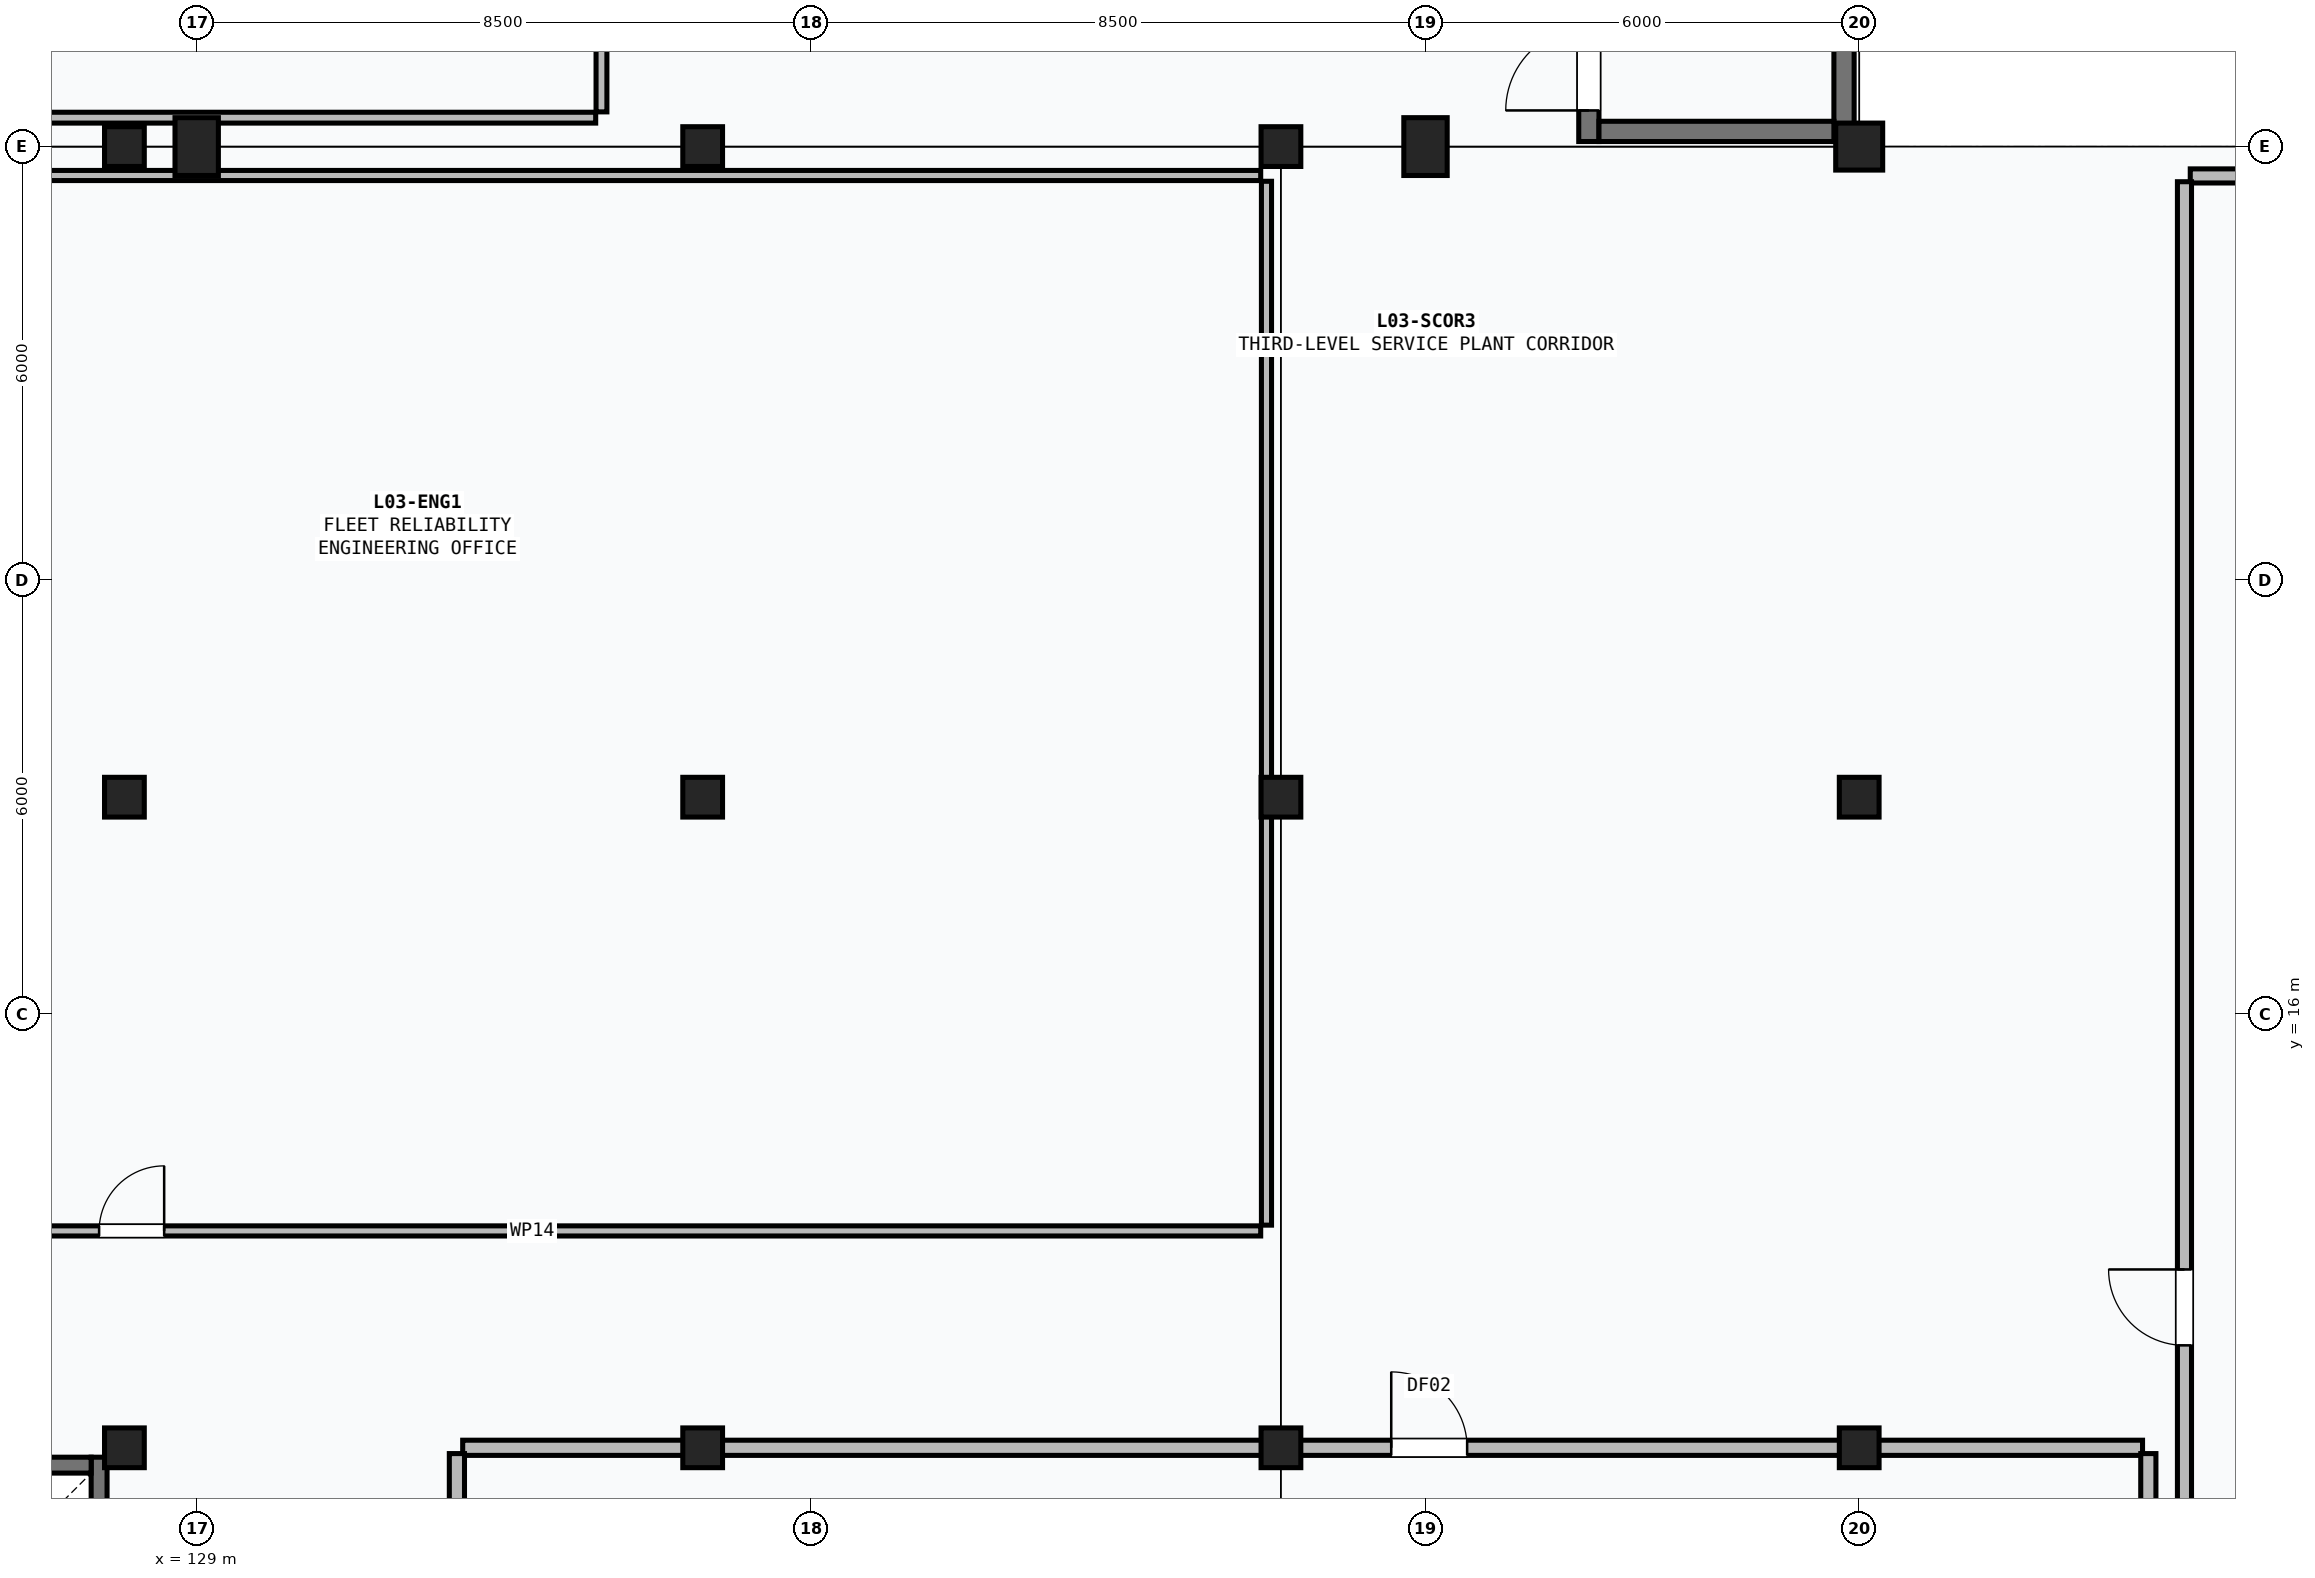
"""IFC4 building model, lengths in metres.
Left out: names, types, materials, properties, quantities, classifications, styles, units other than length and angle.
Written with IfcOpenShell. Run it as: python <this file> out.ifc"""

import sys

from ifc_helpers import new_model, si_unit, direction, frame, frame_2d, origin, origin_2d, place, context, subcontext, project, spatial, rectangle, extrude, element, fill, save


model = new_model("IFC4")
c1 = context("Model", 3, precision=1e-05, world=origin(), true_north=direction((0.0, 1.0)))
c2 = subcontext(c1, "Body", "Model", "MODEL_VIEW")
j1 = project(units=[si_unit("LENGTHUNIT", "METRE"), si_unit("PLANEANGLEUNIT", "RADIAN")], contexts=[c1])
p1 = place(None, origin())
s1 = spatial("IfcSite", under=j1, at=p1, CompositionType="ELEMENT")
p2 = place(p1, origin())
s2 = spatial("IfcBuilding", under=s1, at=p2, CompositionType="ELEMENT")
p3 = place(p2, frame((0.0, 0.0, 12.0)))
s3 = spatial("IfcBuildingStorey", under=s2, at=p3, CompositionType="ELEMENT", Elevation=12.0)
for number, where, z_axis, x_axis in (
    (1, (129.0, 28.0, 0.0), (0.0, 0.0, 1.0), (1.0, 0.0, 0.0)),
    (2, (146.0, 28.0, 0.0), (0.0, 0.0, 1.0), (1.0, 0.0, 0.0)),
):
    element("IfcColumn", number, at=place(p3, frame(where, z_axis=z_axis, x_axis=x_axis)), inside=s3, PredefinedType="COLUMN", context=c2, shape_type="SweptSolid", body=[
        extrude(rectangle(XDim=0.6, YDim=0.8, at=origin_2d()), origin(), (0.0, 0.0, 1.0), 3.6),
    ])
p4 = place(p3, frame((152.0, 28.0, 0.0), z_axis=(0.0, 0.0, 1.0), x_axis=(1.0, 0.0, 0.0)))
e3 = element("IfcColumn", 3, at=p4, inside=s3, PredefinedType="COLUMN", context=c2, shape_type="SweptSolid", body=[
    extrude(rectangle(XDim=0.65, YDim=0.65, at=origin_2d()), origin(), (0.0, 0.0, 1.0), 3.6),
])
for number, where, z_axis, x_axis in (
    (4, (128.0, 10.0, 0.0), (0.0, 0.0, 1.0), (1.0, 0.0, 0.0)),
    (5, (128.0, 19.0, 0.0), (0.0, 0.0, 1.0), (1.0, 0.0, 0.0)),
    (6, (128.0, 28.0, 0.0), (0.0, 0.0, 1.0), (1.0, 0.0, 0.0)),
    (7, (136.0, 10.0, 0.0), (0.0, 0.0, 1.0), (1.0, 0.0, 0.0)),
    (8, (136.0, 19.0, 0.0), (0.0, 0.0, 1.0), (1.0, 0.0, 0.0)),
    (9, (136.0, 28.0, 0.0), (0.0, 0.0, 1.0), (1.0, 0.0, 0.0)),
    (10, (144.0, 10.0, 0.0), (0.0, 0.0, 1.0), (1.0, 0.0, 0.0)),
    (11, (144.0, 19.0, 0.0), (0.0, 0.0, 1.0), (1.0, 0.0, 0.0)),
    (12, (144.0, 28.0, 0.0), (0.0, 0.0, 1.0), (1.0, 0.0, 0.0)),
    (13, (152.0, 10.0, 0.0), (0.0, 0.0, 1.0), (1.0, 0.0, 0.0)),
    (14, (152.0, 19.0, 0.0), (0.0, 0.0, 1.0), (1.0, 0.0, 0.0)),
):
    element("IfcColumn", number, at=place(p3, frame(where, z_axis=z_axis, x_axis=x_axis)), inside=s3, PredefinedType="COLUMN", context=c2, shape_type="SweptSolid", body=[
        extrude(rectangle(XDim=0.55, YDim=0.55, at=origin_2d()), origin(), (0.0, 0.0, 1.0), 3.6),
    ])
p5 = place(p3, frame((148.26, 28.07, 0.0), z_axis=(0.0, 0.0, 1.0), x_axis=(0.0, 1.0, 0.0)))
e15 = element("IfcWall", 15, at=p5, inside=s3, PredefinedType="SHEAR", context=c2, shape_type="SweptSolid", body=[
    extrude(rectangle(XDim=9.86, YDim=0.28, at=frame_2d((4.93, 0.0))), origin(), (0.0, 0.0, 1.0), 3.6),
])
p6 = place(p5, frame((0.43, 0.0, 0.0)))
e16 = element("IfcOpeningElement", 16, at=p6, cuts=e15, PredefinedType="OPENING", context=c2, shape_type="SweptSolid", body=[
    extrude(rectangle(XDim=1.15, YDim=2.15, at=frame_2d((0.575, 1.075))), frame((0.0, 0.15, 0.0), z_axis=(0.0, -1.0, 0.0), x_axis=(1.0, 0.0, 0.0)), (0.0, 0.0, 1.0), 0.3),
])
p7 = place(p3, frame((151.79, 37.93, 0.0), z_axis=(0.0, 0.0, 1.0), x_axis=(0.0, -1.0, 0.0)))
e17 = element("IfcWall", 17, at=p7, inside=s3, PredefinedType="SHEAR", context=c2, shape_type="SweptSolid", body=[
    extrude(rectangle(XDim=9.86, YDim=0.28, at=frame_2d((4.93, 0.0))), origin(), (0.0, 0.0, 1.0), 3.6),
])
p8 = place(p3, frame((151.65, 28.21, 0.0), z_axis=(0.0, 0.0, 1.0), x_axis=(-1.0, 0.0, 0.0)))
e18 = element("IfcWall", 18, at=p8, inside=s3, PredefinedType="SHEAR", context=c2, shape_type="SweptSolid", body=[
    extrude(rectangle(XDim=3.25, YDim=0.28, at=frame_2d((1.625, 0.0))), origin(), (0.0, 0.0, 1.0), 3.6),
])
p9 = place(p3, frame((127.65, 9.87, 0.0), z_axis=(0.0, 0.0, 1.0), x_axis=(0.0, -1.0, 0.0)))
e19 = element("IfcWall", 19, at=p9, inside=s3, PredefinedType="SHEAR", context=c2, shape_type="SweptSolid", body=[
    extrude(rectangle(XDim=3.81, YDim=0.22, at=frame_2d((1.905, 0.0))), origin(), (0.0, 0.0, 1.0), 3.6),
])
p10 = place(p9, frame((1.205, 0.0, 0.0)))
e20 = element("IfcOpeningElement", 20, at=p10, cuts=e19, PredefinedType="OPENING", context=c2, shape_type="SweptSolid", body=[
    extrude(rectangle(XDim=1.4, YDim=2.3, at=frame_2d((0.7, 1.15))), frame((0.0, 0.12, 0.0), z_axis=(0.0, -1.0, 0.0), x_axis=(1.0, 0.0, 0.0)), (0.0, 0.0, 1.0), 0.24),
])
p11 = place(p3, frame((123.94, 9.76, 0.0), z_axis=(0.0, 0.0, 1.0), x_axis=(1.0, 0.0, 0.0)))
e21 = element("IfcWall", 21, at=p11, inside=s3, PredefinedType="SHEAR", context=c2, shape_type="SweptSolid", body=[
    extrude(rectangle(XDim=3.6, YDim=0.22, at=frame_2d((1.8, 0.0))), origin(), (0.0, 0.0, 1.0), 3.6),
])
p12 = place(p3, frame((112.48, 28.4, 0.0), z_axis=(0.0, 0.0, 1.0), x_axis=(1.0, 0.0, 0.0)))
e22 = element("IfcWall", 22, at=p12, inside=s3, PredefinedType="PARTITIONING", context=c2, shape_type="SweptSolid", body=[
    extrude(rectangle(XDim=22.04, YDim=0.15, at=frame_2d((11.02, 0.0))), origin(), (0.0, 0.0, 1.0), 2.495),
])
p13 = place(p3, frame((134.6, 28.48, 0.0), z_axis=(0.0, 0.0, 1.0), x_axis=(0.0, 1.0, 0.0)))
e23 = element("IfcWall", 23, at=p13, inside=s3, PredefinedType="PARTITIONING", context=c2, shape_type="SweptSolid", body=[
    extrude(rectangle(XDim=9.44, YDim=0.15, at=frame_2d((4.72, 0.0))), origin(), (0.0, 0.0, 1.0), 3.345),
])
p14 = place(p13, frame((3.92, 0.0, 0.0)))
e24 = element("IfcOpeningElement", 24, at=p14, cuts=e23, PredefinedType="OPENING", context=c2, shape_type="SweptSolid", body=[
    extrude(rectangle(XDim=1.6, YDim=2.15, at=frame_2d((0.8, 1.075))), frame((0.0, 0.085, 0.0), z_axis=(0.0, -1.0, 0.0), x_axis=(1.0, 0.0, 0.0)), (0.0, 0.0, 1.0), 0.17),
])
p15 = place(p3, frame((112.48, 13.0, 0.0), z_axis=(0.0, 0.0, 1.0), x_axis=(1.0, 0.0, 0.0)))
e25 = element("IfcWall", 25, at=p15, inside=s3, PredefinedType="PARTITIONING", context=c2, shape_type="SweptSolid", body=[
    extrude(rectangle(XDim=31.24, YDim=0.14, at=frame_2d((15.62, 0.0))), origin(), (0.0, 0.0, 1.0), 2.645),
])
p16 = place(p15, frame((15.17, 0.0, 0.0)))
e26 = element("IfcOpeningElement", 26, at=p16, cuts=e25, PredefinedType="OPENING", context=c2, shape_type="SweptSolid", body=[
    extrude(rectangle(XDim=0.9, YDim=2.1, at=frame_2d((0.45, 1.05))), frame((0.0, 0.08, 0.0), z_axis=(0.0, -1.0, 0.0), x_axis=(1.0, 0.0, 0.0)), (0.0, 0.0, 1.0), 0.16),
])
p17 = place(p3, frame((112.48, 27.6, 0.0), z_axis=(0.0, 0.0, 1.0), x_axis=(1.0, 0.0, 0.0)))
e27 = element("IfcWall", 27, at=p17, inside=s3, PredefinedType="PARTITIONING", context=c2, shape_type="SweptSolid", body=[
    extrude(rectangle(XDim=31.24, YDim=0.14, at=frame_2d((15.62, 0.0))), origin(), (0.0, 0.0, 1.0), 2.245),
])
p18 = place(p3, frame((143.8, 13.08, 0.0), z_axis=(0.0, 0.0, 1.0), x_axis=(0.0, 1.0, 0.0)))
e28 = element("IfcWall", 28, at=p18, inside=s3, PredefinedType="PARTITIONING", context=c2, shape_type="SweptSolid", body=[
    extrude(rectangle(XDim=14.44, YDim=0.14, at=frame_2d((7.22, 0.0))), origin(), (0.0, 0.0, 1.0), 2.245),
])
p19 = place(p3, frame((132.68, 10.0, 0.0), z_axis=(0.0, 0.0, 1.0), x_axis=(1.0, 0.0, 0.0)))
e29 = element("IfcWall", 29, at=p19, inside=s3, PredefinedType="PARTITIONING", context=c2, shape_type="SweptSolid", body=[
    extrude(rectangle(XDim=23.24, YDim=0.21, at=frame_2d((11.62, 0.0))), origin(), (0.0, 0.0, 1.0), 2.245),
])
p20 = place(p19, frame((12.846, 0.0, 0.0)))
e30 = element("IfcOpeningElement", 30, at=p20, cuts=e29, PredefinedType="OPENING", context=c2, shape_type="SweptSolid", body=[
    extrude(rectangle(XDim=1.05, YDim=2.15, at=frame_2d((0.525, 1.075))), frame((0.0, 0.115, 0.0), z_axis=(0.0, -1.0, 0.0), x_axis=(1.0, 0.0, 0.0)), (0.0, 0.0, 1.0), 0.23),
])
p21 = place(p3, frame((132.6, 0.48, 0.0), z_axis=(0.0, 0.0, 1.0), x_axis=(0.0, 1.0, 0.0)))
e31 = element("IfcWall", 31, at=p21, inside=s3, PredefinedType="PARTITIONING", context=c2, shape_type="SweptSolid", body=[
    extrude(rectangle(XDim=9.44, YDim=0.21, at=frame_2d((4.72, 0.0))), origin(), (0.0, 0.0, 1.0), 2.745),
])
p22 = place(p3, frame((156.0, 0.48, 0.0), z_axis=(0.0, 0.0, 1.0), x_axis=(0.0, 1.0, 0.0)))
e32 = element("IfcWall", 32, at=p22, inside=s3, PredefinedType="PARTITIONING", context=c2, shape_type="SweptSolid", body=[
    extrude(rectangle(XDim=9.44, YDim=0.21, at=frame_2d((4.72, 0.0))), origin(), (0.0, 0.0, 1.0), 2.495),
])
p23 = place(p3, frame((156.58, 27.594, 0.0), z_axis=(0.0, 0.0, 1.0), x_axis=(1.0, 0.0, 0.0)))
e33 = element("IfcWall", 33, at=p23, inside=s3, PredefinedType="PARTITIONING", context=c2, shape_type="SweptSolid", body=[
    extrude(rectangle(XDim=26.934, YDim=0.195, at=frame_2d((13.467, 0.0))), origin(), (0.0, 0.0, 1.0), 2.495),
])
p24 = place(p3, frame((156.5, 0.48, 0.0), z_axis=(0.0, 0.0, 1.0), x_axis=(0.0, 1.0, 0.0)))
e34 = element("IfcWall", 34, at=p24, inside=s3, PredefinedType="PARTITIONING", context=c2, shape_type="SweptSolid", body=[
    extrude(rectangle(XDim=27.034, YDim=0.195, at=frame_2d((13.517, 0.0))), origin(), (0.0, 0.0, 1.0), 2.495),
])
p25 = place(p24, frame((10.937, 0.0, 0.0)))
e35 = element("IfcOpeningElement", 35, at=p25, cuts=e34, PredefinedType="OPENING", context=c2, shape_type="SweptSolid", body=[
    extrude(rectangle(XDim=1.05, YDim=2.15, at=frame_2d((0.525, 1.075))), frame((0.0, 0.107, 0.0), z_axis=(0.0, -1.0, 0.0), x_axis=(1.0, 0.0, 0.0)), (0.0, 0.0, 1.0), 0.215),
])
p26 = place(p6, origin())
e36 = element("IfcDoor", 36, at=p26, inside=s3, OperationType="SINGLE_SWING_LEFT", PredefinedType="DOOR", context=c2, shape_type="SweptSolid", body=[
    extrude(rectangle(XDim=1.15, YDim=2.15, at=frame_2d((0.575, 1.075))), frame((0.0, 0.025, 0.0), z_axis=(0.0, -1.0, 0.0), x_axis=(1.0, 0.0, 0.0)), (0.0, 0.0, 1.0), 0.05),
])
fill(e16, e36)
p27 = place(p16, origin())
e37 = element("IfcDoor", 37, at=p27, inside=s3, OperationType="SINGLE_SWING_RIGHT", PredefinedType="DOOR", context=c2, shape_type="SweptSolid", body=[
    extrude(rectangle(XDim=0.9, YDim=2.1, at=frame_2d((0.45, 1.05))), frame((0.0, 0.025, 0.0), z_axis=(0.0, -1.0, 0.0), x_axis=(1.0, 0.0, 0.0)), (0.0, 0.0, 1.0), 0.05),
])
fill(e26, e37)
p28 = place(p20, origin())
e38 = element("IfcDoor", 38, at=p28, inside=s3, OperationType="SINGLE_SWING_LEFT", PredefinedType="DOOR", context=c2, shape_type="SweptSolid", body=[
    extrude(rectangle(XDim=1.05, YDim=2.15, at=frame_2d((0.525, 1.075))), frame((0.0, 0.025, 0.0), z_axis=(0.0, -1.0, 0.0), x_axis=(1.0, 0.0, 0.0)), (0.0, 0.0, 1.0), 0.05),
])
fill(e30, e38)
p29 = place(p25, origin())
e39 = element("IfcDoor", 39, at=p29, inside=s3, OperationType="SINGLE_SWING_RIGHT", PredefinedType="DOOR", context=c2, shape_type="SweptSolid", body=[
    extrude(rectangle(XDim=1.05, YDim=2.15, at=frame_2d((0.525, 1.075))), frame((0.0, 0.025, 0.0), z_axis=(0.0, -1.0, 0.0), x_axis=(1.0, 0.0, 0.0)), (0.0, 0.0, 1.0), 0.05),
])
fill(e35, e39)
save(model, sys.argv[1])
